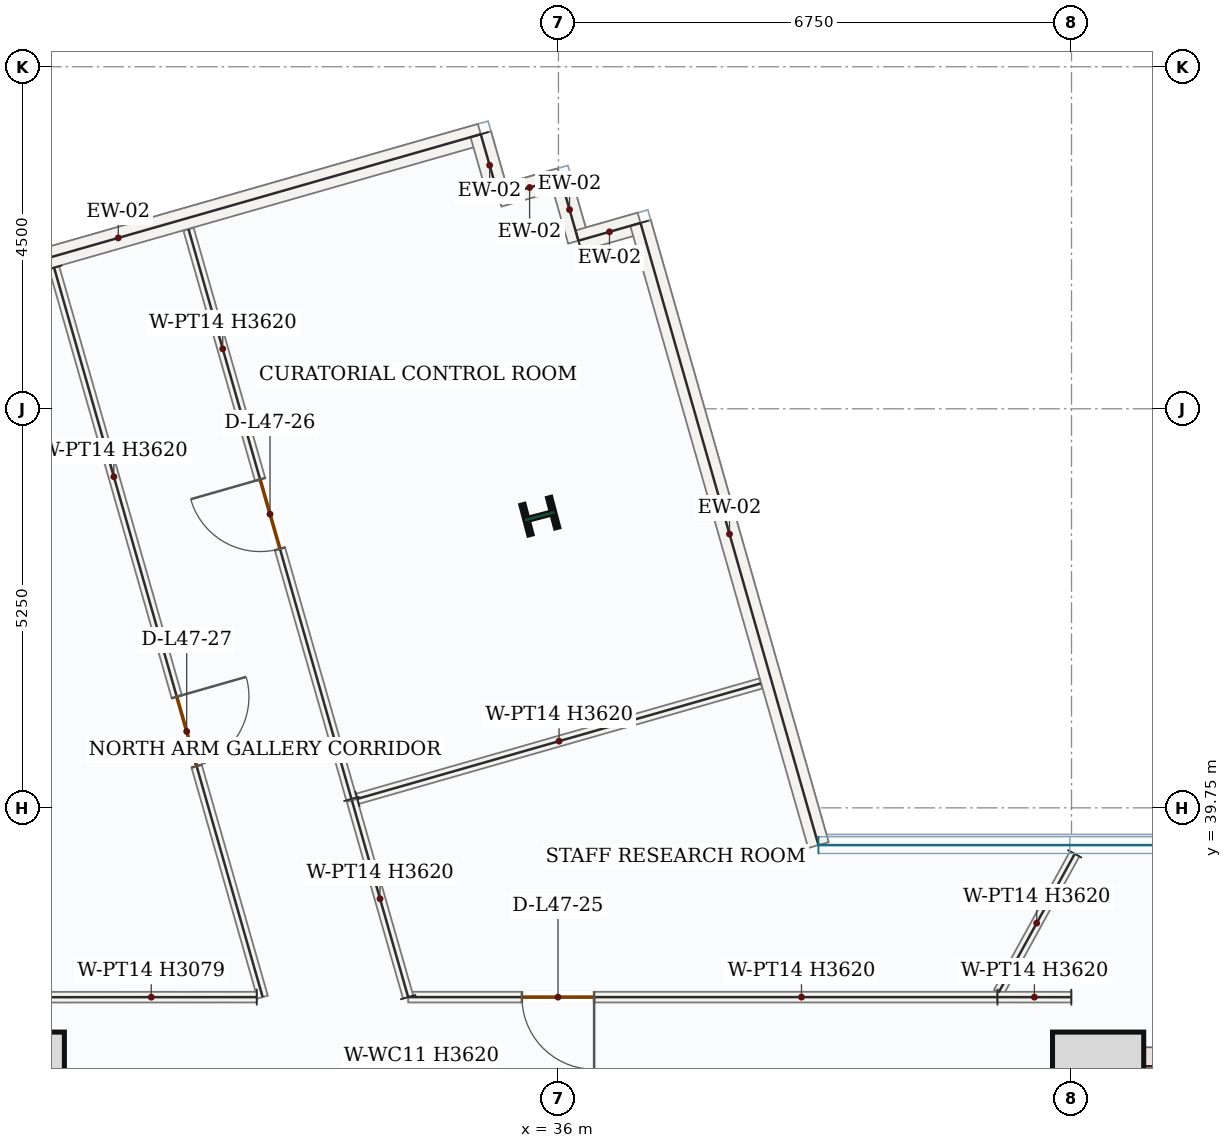
"""IFC4 building model, lengths in metres.
Left out: names, types, materials, properties, quantities, classifications, styles, units other than length and angle.
Written with IfcOpenShell. Run it as: python <this file> out.ifc"""

import sys

from ifc_helpers import new_model, si_unit, direction, frame, frame_2d, origin, origin_2d, place, context, subcontext, project, spatial, rectangle, i_section, extrude, source, transform, mapped, element, fill, save


model = new_model("IFC4")
c1 = context("Model", 3, precision=1e-05, world=origin(), true_north=direction((0.0, 1.0)))
c2 = subcontext(c1, "Body", "Model", "MODEL_VIEW")
j1 = project(units=[si_unit("LENGTHUNIT", "METRE"), si_unit("PLANEANGLEUNIT", "RADIAN")], contexts=[c1])
p1 = place(None, origin())
s1 = spatial("IfcSite", under=j1, at=p1, CompositionType="ELEMENT")
p2 = place(p1, origin())
s2 = spatial("IfcBuilding", under=s1, at=p2, CompositionType="ELEMENT")
p3 = place(p2, frame((0.0, 0.0, 201.9)))
s3 = spatial("IfcBuildingStorey", under=s2, at=p3, CompositionType="ELEMENT", Elevation=201.9)
p4 = place(p3, frame((43.0, 28.05, 0.0), z_axis=(0.0, 0.0, 1.0), x_axis=(0.0, 1.0, 0.0)))
e1 = element("IfcWall", 1, at=p4, inside=s3, PredefinedType="SHEAR", context=c2, shape_type="SweptSolid", body=[
    extrude(rectangle(XDim=8.55, YDim=0.5, at=frame_2d((4.275, 0.0))), origin(), (0.0, 0.0, 1.0), 3.62),
])
p5 = place(p4, frame((1.5, 0.0, 0.0)))
e2 = element("IfcOpeningElement", 2, at=p5, cuts=e1, PredefinedType="OPENING", context=c2, shape_type="SweptSolid", body=[
    extrude(rectangle(XDim=1.1, YDim=2.2, at=frame_2d((0.55, 1.1))), frame((0.0, 0.26, 0.0), z_axis=(0.0, -1.0, 0.0), x_axis=(1.0, 0.0, 0.0)), (0.0, 0.0, 1.0), 0.52),
])
m1 = source(origin(), c2, "Body", "SweptSolid", [
    extrude(rectangle(XDim=7.0, YDim=0.5, at=frame_2d((3.5, 0.0))), origin(), (0.0, 0.0, 1.0), 3.62),
])
p6 = place(p3, frame((43.25, 36.35, 0.0), z_axis=(0.0, 0.0, 1.0), x_axis=(1.0, 0.0, 0.0)))
e3 = element("IfcWall", 3, at=p6, inside=s3, PredefinedType="SHEAR", context=c2, shape_type="MappedRepresentation", body=[
    mapped(m1, transform((0.0, 0.0, 0.0), x_axis=(1.0, 0.0, 0.0), y_axis=(0.0, 1.0, 0.0), z_axis=(0.0, 0.0, 1.0), scale=1.0)),
])
m2 = source(origin(), c2, "Body", "SweptSolid", [
    extrude(rectangle(XDim=1.2, YDim=1.2, at=origin_2d()), origin(), (0.0, 0.0, 1.0), 3.9),
])
for number, where, z_axis, x_axis in (
    (4, (28.9, 36.2, 0.0), (0.0, 0.0, 1.0), (1.0, 0.0, 0.0)),
    (5, (43.1, 36.2, 0.0), (0.0, 0.0, 1.0), (1.0, 0.0, 0.0)),
):
    element("IfcColumn", number, at=place(p3, frame(where, z_axis=z_axis, x_axis=x_axis)), inside=s3, PredefinedType="COLUMN", context=c2, shape_type="MappedRepresentation", body=[
        mapped(m2, transform((0.0, 0.0, 0.0), x_axis=(1.0, 0.0, 0.0), y_axis=(0.0, 1.0, 0.0), z_axis=(0.0, 0.0, 1.0), scale=1.0)),
    ])
m3 = source(origin(), c2, "Body", "SweptSolid", [
    extrude(i_section(OverallWidth=0.404, OverallDepth=0.407, WebThickness=0.027, FlangeThickness=0.044, FilletRadius=0.018, at=origin_2d()), origin(), (0.0, 0.0, 1.0), 3.9),
])
p7 = place(p3, frame((35.755, 43.588, 0.0), z_axis=(0.0, 0.0, 1.0), x_axis=(-0.255445757936, 0.966823388604, 0.0)))
e6 = element("IfcColumn", 6, at=p7, inside=s3, PredefinedType="COLUMN", context=c2, shape_type="MappedRepresentation", body=[
    mapped(m3, transform((0.0, 0.0, 0.0), x_axis=(1.0, 0.0, 0.0), y_axis=(0.0, 1.0, 0.0), z_axis=(0.0, 0.0, 1.0), scale=1.0)),
])
m4 = source(origin(), c2, "Body", "SweptSolid", [
    extrude(rectangle(XDim=9.92, YDim=0.28, at=frame_2d((4.96, 0.0))), origin(), (0.0, 0.0, 1.0), 3.62),
])
p8 = place(p3, frame((25.44, 45.885, 0.0), z_axis=(0.0, 0.0, 1.0), x_axis=(0.961457051276, 0.274955157346, 0.0)))
e7 = element("IfcWall", 7, at=p8, inside=s3, PredefinedType="SOLIDWALL", context=c2, shape_type="MappedRepresentation", body=[
    mapped(m4, transform((0.0, 0.0, 0.0), x_axis=(1.0, 0.0, 0.0), y_axis=(0.0, 1.0, 0.0), z_axis=(0.0, 0.0, 1.0), scale=1.0)),
])
m5 = source(origin(), c2, "Body", "SweptSolid", [
    extrude(rectangle(XDim=0.85, YDim=0.28, at=frame_2d((0.425, 0.0))), origin(), (0.0, 0.0, 1.0), 3.62),
])
for number, where, z_axis, x_axis in (
    (8, (34.978, 48.612, 0.0), (0.0, 0.0, 1.0), (0.275, -0.961, 0.0)),
    (9, (35.212, 47.795, 0.0), (0.0, 0.0, 1.0), (0.961, 0.275, 0.0)),
):
    element("IfcWall", number, at=place(p3, frame(where, z_axis=z_axis, x_axis=x_axis)), inside=s3, PredefinedType="SOLIDWALL", context=c2, shape_type="MappedRepresentation", body=[
        mapped(m5, transform((0.0, 0.0, 0.0), x_axis=(1.0, 0.0, 0.0), y_axis=(0.0, 1.0, 0.0), z_axis=(0.0, 0.0, 1.0), scale=1.0)),
    ])
m6 = source(origin(), c2, "Body", "SweptSolid", [
    extrude(rectangle(XDim=0.85, YDim=0.28, at=frame_2d((0.425, 0.0))), origin(), (0.0, 0.0, 1.0), 3.62),
])
p9 = place(p3, frame((36.029, 48.029, 0.0), z_axis=(0.0, 0.0, 1.0), x_axis=(0.274834915789, -0.961491429532, 0.0)))
e10 = element("IfcWall", 10, at=p9, inside=s3, PredefinedType="SOLIDWALL", context=c2, shape_type="MappedRepresentation", body=[
    mapped(m6, transform((0.0, 0.0, 0.0), x_axis=(1.0, 0.0, 0.0), y_axis=(0.0, 1.0, 0.0), z_axis=(0.0, 0.0, 1.0), scale=1.0)),
])
p10 = place(p3, frame((36.263, 47.211, 0.0), z_axis=(0.0, 0.0, 1.0), x_axis=(0.961393768724, 0.275176346112, 0.0)))
e11 = element("IfcWall", 11, at=p10, inside=s3, PredefinedType="SOLIDWALL", context=c2, shape_type="MappedRepresentation", body=[
    mapped(m5, transform((0.0, 0.0, 0.0), x_axis=(1.0, 0.0, 0.0), y_axis=(0.0, 1.0, 0.0), z_axis=(0.0, 0.0, 1.0), scale=1.0)),
])
m7 = source(origin(), c2, "Body", "SweptSolid", [
    extrude(rectangle(XDim=8.513, YDim=0.28, at=frame_2d((4.257, 0.0))), origin(), (0.0, 0.0, 1.0), 3.62),
])
p11 = place(p3, frame((37.08, 47.445, 0.0), z_axis=(0.0, 0.0, 1.0), x_axis=(0.27496352843, -0.961454657295, 0.0)))
e12 = element("IfcWall", 12, at=p11, inside=s3, PredefinedType="SOLIDWALL", context=c2, shape_type="MappedRepresentation", body=[
    mapped(m7, transform((0.0, 0.0, 0.0), x_axis=(1.0, 0.0, 0.0), y_axis=(0.0, 1.0, 0.0), z_axis=(0.0, 0.0, 1.0), scale=1.0)),
])
p12 = place(p3, frame((41.775, 37.26, 0.0), z_axis=(0.0, 0.0, 1.0), x_axis=(-1.0, 0.0, 0.0)))
e13 = element("IfcWall", 13, at=p12, inside=s3, PredefinedType="PARTITIONING", context=c2, shape_type="SweptSolid", body=[
    extrude(rectangle(XDim=7.753, YDim=0.14, at=frame_2d((3.876, 0.0))), origin(), (0.0, 0.0, 1.0), 3.62),
])
p13 = place(p12, frame((5.306, 0.0, 0.0)))
e14 = element("IfcOpeningElement", 14, at=p13, cuts=e13, PredefinedType="OPENING", context=c2, shape_type="SweptSolid", body=[
    extrude(rectangle(XDim=0.95, YDim=2.15, at=frame_2d((0.475, 1.075))), frame((0.0, 0.08, 0.0), z_axis=(0.0, -1.0, 0.0), x_axis=(1.0, 0.0, 0.0)), (0.0, 0.0, 1.0), 0.16),
])
m8 = source(origin(), c2, "Body", "SweptSolid", [
    extrude(rectangle(XDim=2.692, YDim=0.14, at=frame_2d((1.346, 0.0))), origin(), (0.0, 0.0, 1.0), 3.62),
])
p14 = place(p3, frame((34.023, 37.26, 0.0), z_axis=(0.0, 0.0, 1.0), x_axis=(-0.27500862401, 0.961441759401, 0.0)))
e15 = element("IfcWall", 15, at=p14, inside=s3, PredefinedType="PARTITIONING", context=c2, shape_type="MappedRepresentation", body=[
    mapped(m8, transform((0.0, 0.0, 0.0), x_axis=(1.0, 0.0, 0.0), y_axis=(0.0, 1.0, 0.0), z_axis=(0.0, 0.0, 1.0), scale=1.0)),
])
m9 = source(origin(), c2, "Body", "SweptSolid", [
    extrude(rectangle(XDim=5.52, YDim=0.14, at=frame_2d((2.76, 0.0))), origin(), (0.0, 0.0, 1.0), 3.62),
])
p15 = place(p3, frame((33.354, 39.869, 0.0), z_axis=(0.0, 0.0, 1.0), x_axis=(0.961455490798, 0.274960613933, 0.0)))
e16 = element("IfcWall", 16, at=p15, inside=s3, PredefinedType="PARTITIONING", context=c2, shape_type="MappedRepresentation", body=[
    mapped(m9, transform((0.0, 0.0, 0.0), x_axis=(1.0, 0.0, 0.0), y_axis=(0.0, 1.0, 0.0), z_axis=(0.0, 0.0, 1.0), scale=1.0)),
])
m10 = source(origin(), c2, "Body", "SweptSolid", [
    extrude(rectangle(XDim=2.08, YDim=0.14, at=frame_2d((1.04, 0.0))), origin(), (0.0, 0.0, 1.0), 3.62),
])
p16 = place(p3, frame((42.792, 39.145, 0.0), z_axis=(0.0, 0.0, 1.0), x_axis=(-0.481301259497, -0.87655524504, 0.0)))
e17 = element("IfcWall", 17, at=p16, inside=s3, PredefinedType="PARTITIONING", context=c2, shape_type="MappedRepresentation", body=[
    mapped(m10, transform((0.0, 0.0, 0.0), x_axis=(1.0, 0.0, 0.0), y_axis=(0.0, 1.0, 0.0), z_axis=(0.0, 0.0, 1.0), scale=1.0)),
])
p17 = place(p3, frame((33.277, 39.867, 0.0), z_axis=(0.0, 0.0, 1.0), x_axis=(-0.274985856522, 0.96144827147, 0.0)))
e18 = element("IfcWall", 18, at=p17, inside=s3, PredefinedType="PARTITIONING", context=c2, shape_type="SweptSolid", body=[
    extrude(rectangle(XDim=7.795, YDim=0.14, at=frame_2d((3.897, 0.0))), origin(), (0.0, 0.0, 1.0), 3.62),
])
p18 = place(p17, frame((3.423, 0.0, 0.0)))
e19 = element("IfcOpeningElement", 19, at=p18, cuts=e18, PredefinedType="OPENING", context=c2, shape_type="SweptSolid", body=[
    extrude(rectangle(XDim=0.95, YDim=2.15, at=frame_2d((0.475, 1.075))), frame((0.0, 0.08, 0.0), z_axis=(0.0, -1.0, 0.0), x_axis=(1.0, 0.0, 0.0)), (0.0, 0.0, 1.0), 0.16),
])
m11 = source(origin(), c2, "Body", "SweptSolid", [
    extrude(rectangle(XDim=0.972, YDim=0.14, at=frame_2d((0.486, 0.0))), origin(), (0.0, 0.0, 1.0), 3.62),
])
p19 = place(p3, frame((42.748, 37.259, 0.0), z_axis=(0.0, 0.0, 1.0), x_axis=(-0.999999716202, 0.000753390042, 0.0)))
e20 = element("IfcWall", 20, at=p19, inside=s3, PredefinedType="PARTITIONING", context=c2, shape_type="MappedRepresentation", body=[
    mapped(m11, transform((0.0, 0.0, 0.0), x_axis=(1.0, 0.0, 0.0), y_axis=(0.0, 1.0, 0.0), z_axis=(0.0, 0.0, 1.0), scale=1.0)),
])
p20 = place(p3, frame((29.365, 46.856, 0.0), z_axis=(0.0, 0.0, 1.0), x_axis=(0.274969885882, -0.961452839123, 0.0)))
e21 = element("IfcWall", 21, at=p20, inside=s3, PredefinedType="PARTITIONING", context=c2, shape_type="SweptSolid", body=[
    extrude(rectangle(XDim=9.981, YDim=0.14, at=frame_2d((4.99, 0.0))), origin(), (0.0, 0.0, 1.0), 3.62),
])
p21 = place(p20, frame((5.87, 0.0, 0.0)))
e22 = element("IfcOpeningElement", 22, at=p21, cuts=e21, PredefinedType="OPENING", context=c2, shape_type="SweptSolid", body=[
    extrude(rectangle(XDim=0.95, YDim=2.15, at=frame_2d((0.475, 1.075))), frame((0.0, 0.08, 0.0), z_axis=(0.0, -1.0, 0.0), x_axis=(1.0, 0.0, 0.0)), (0.0, 0.0, 1.0), 0.16),
])
m12 = source(origin(), c2, "Body", "SweptSolid", [
    extrude(rectangle(XDim=2.776, YDim=0.14, at=frame_2d((1.388, 0.0))), origin(), (0.0, 0.0, 1.0), 3.079),
])
p22 = place(p3, frame((32.031, 37.26, 0.0), z_axis=(0.0, 0.0, 1.0), x_axis=(-0.999999903325, -0.000439715022, 0.0)))
e23 = element("IfcWall", 23, at=p22, inside=s3, PredefinedType="PARTITIONING", context=c2, shape_type="MappedRepresentation", body=[
    mapped(m12, transform((0.0, 0.0, 0.0), x_axis=(1.0, 0.0, 0.0), y_axis=(0.0, 1.0, 0.0), z_axis=(0.0, 0.0, 1.0), scale=1.0)),
])
m13 = source(origin(), c2, "Body", "SweptSolid", [
    extrude(rectangle(XDim=0.95, YDim=2.15, at=frame_2d((0.475, 1.075))), frame((0.0, 0.025, 0.0), z_axis=(0.0, -1.0, 0.0), x_axis=(1.0, 0.0, 0.0)), (0.0, 0.0, 1.0), 0.05),
])
p23 = place(p13, origin())
e24 = element("IfcDoor", 24, at=p23, inside=s3, OperationType="SINGLE_SWING_LEFT", PredefinedType="DOOR", context=c2, shape_type="MappedRepresentation", body=[
    mapped(m13, transform((0.0, 0.0, 0.0), x_axis=(1.0, 0.0, 0.0), y_axis=(0.0, 1.0, 0.0), z_axis=(0.0, 0.0, 1.0), scale=1.0)),
])
fill(e14, e24)
p24 = place(p18, origin())
e25 = element("IfcDoor", 25, at=p24, inside=s3, OperationType="SINGLE_SWING_RIGHT", PredefinedType="DOOR", context=c2, shape_type="MappedRepresentation", body=[
    mapped(m13, transform((0.0, 0.0, 0.0), x_axis=(1.0, 0.0, 0.0), y_axis=(0.0, 1.0, 0.0), z_axis=(0.0, 0.0, 1.0), scale=1.0)),
])
fill(e19, e25)
p25 = place(p21, origin())
e26 = element("IfcDoor", 26, at=p25, inside=s3, OperationType="SINGLE_SWING_LEFT", PredefinedType="DOOR", context=c2, shape_type="MappedRepresentation", body=[
    mapped(m13, transform((0.0, 0.0, 0.0), x_axis=(1.0, 0.0, 0.0), y_axis=(0.0, 1.0, 0.0), z_axis=(0.0, 0.0, 1.0), scale=1.0)),
])
fill(e22, e26)
save(model, sys.argv[1])
